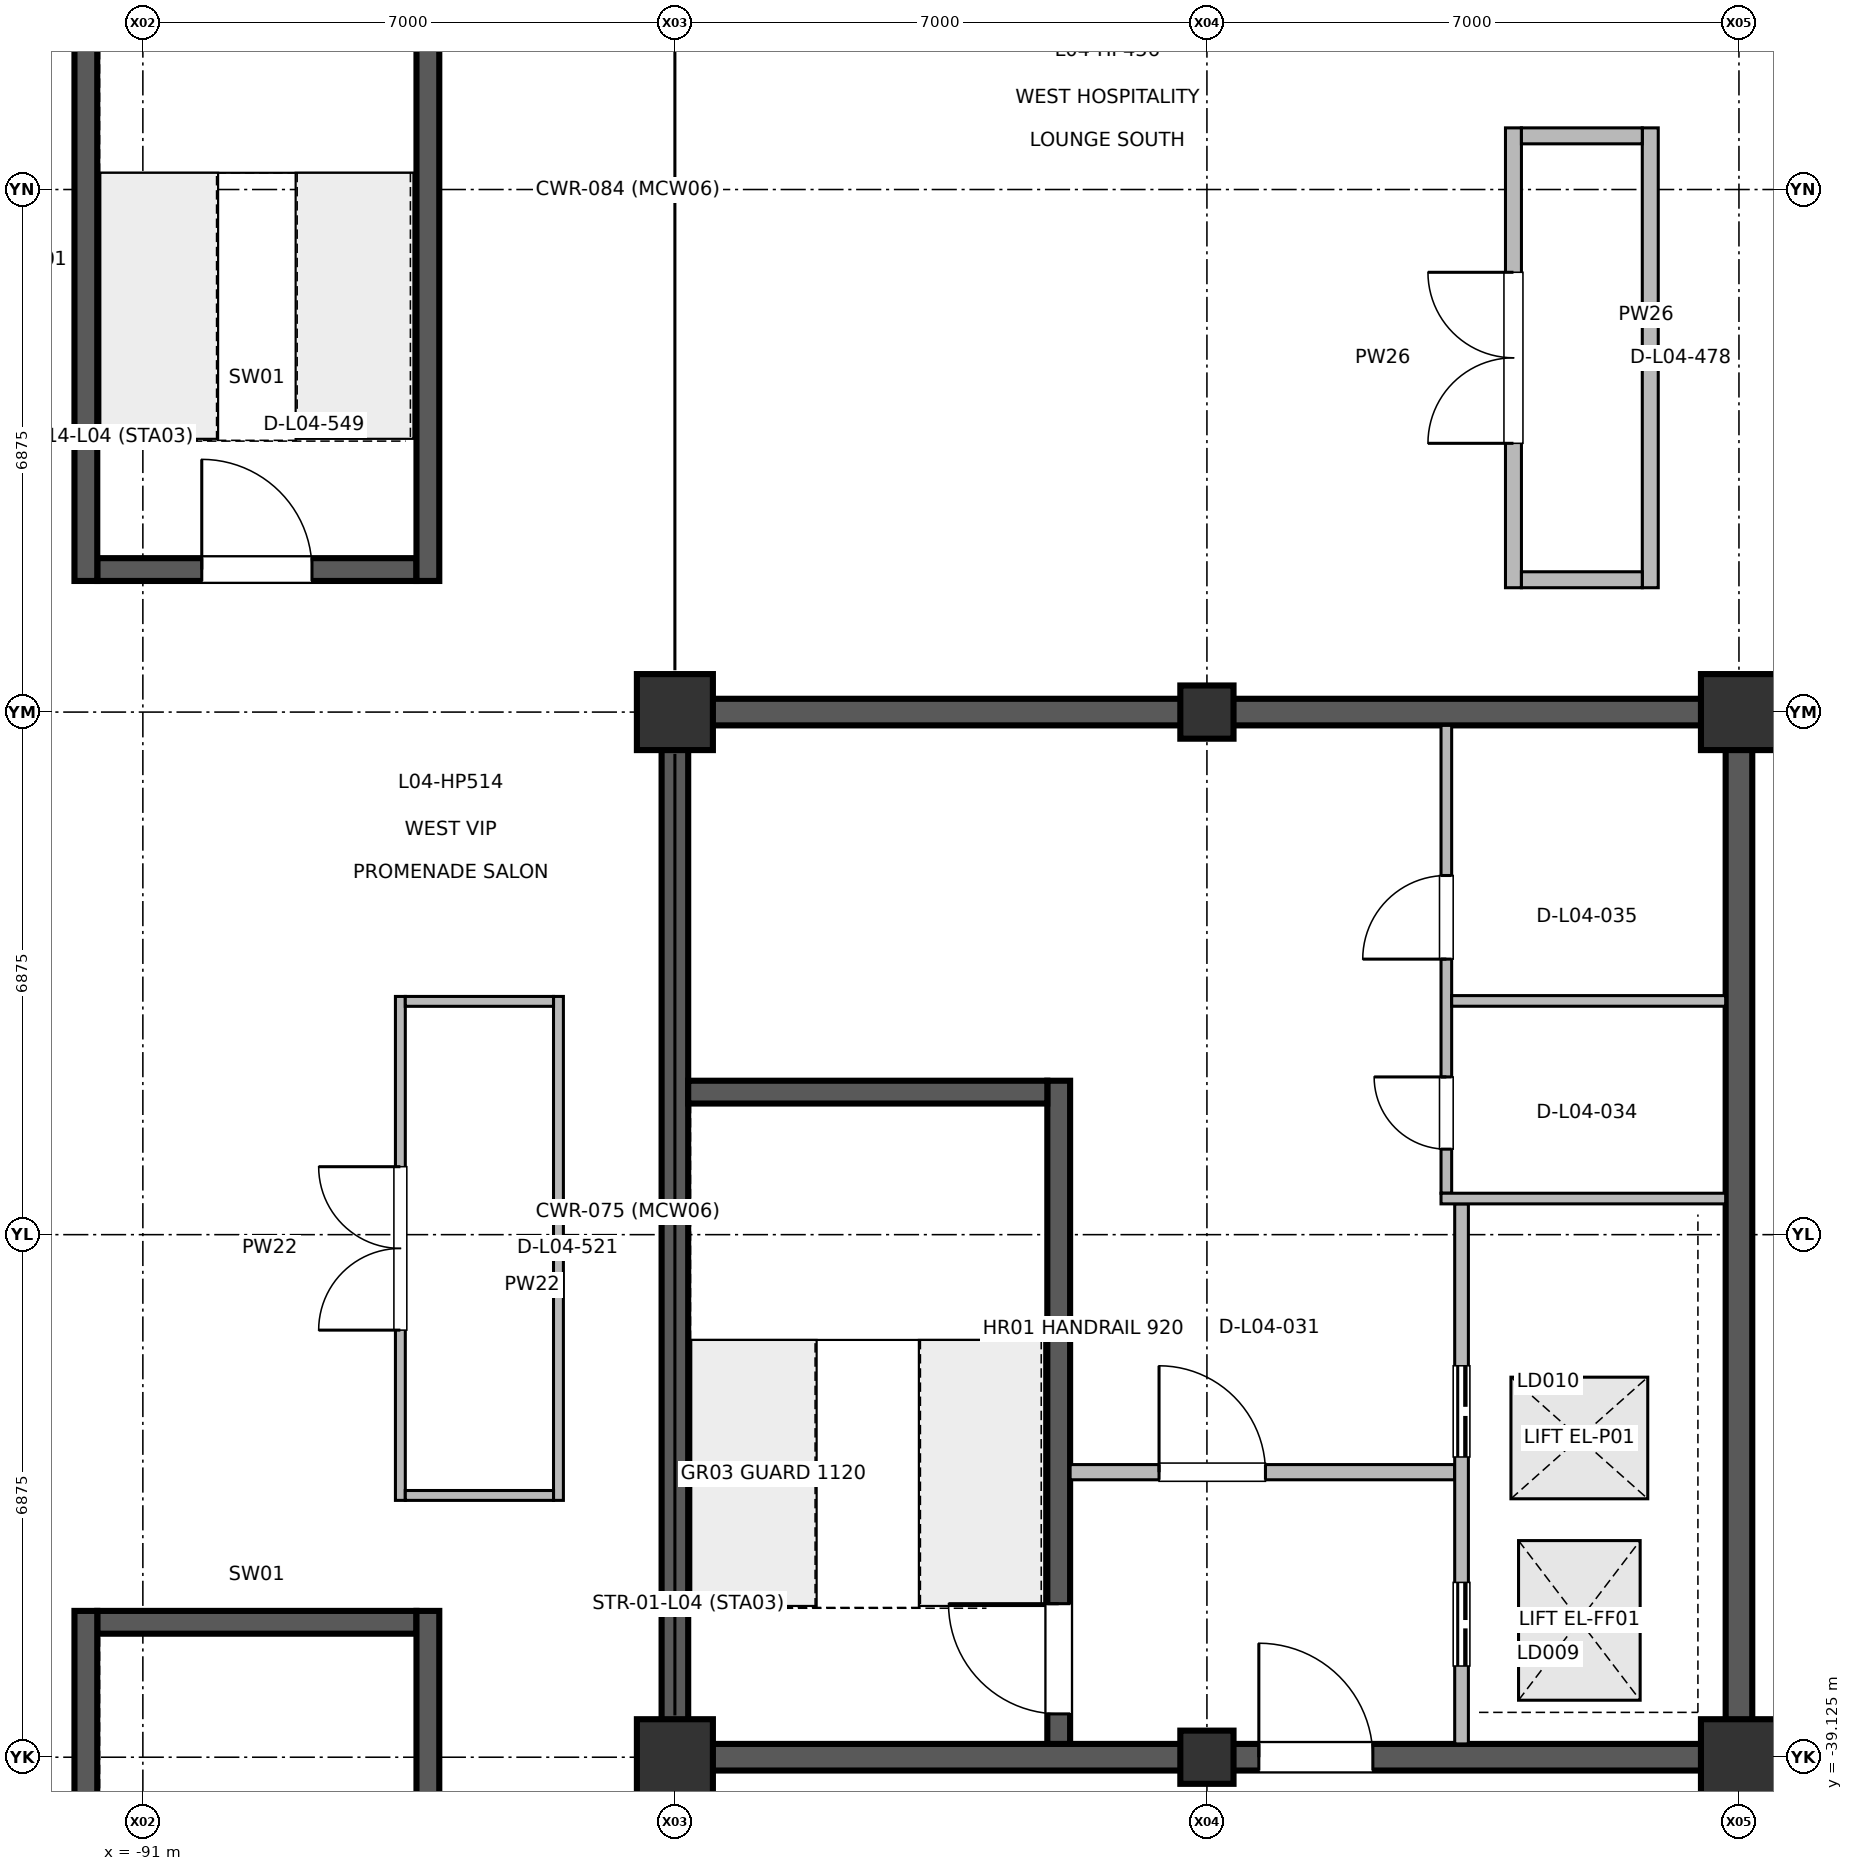
"""IFC4 building model, lengths in metres.
Left out: names, types, materials, properties, quantities, classifications, styles, units other than length and angle.
Written with IfcOpenShell. Run it as: python <this file> out.ifc"""

import sys

from ifc_helpers import new_model, si_unit, direction, frame, frame_2d, origin, origin_2d, place, context, subcontext, project, spatial, rectangle, extrude, element, fill, save


model = new_model("IFC4")
c1 = context("Model", 3, precision=1e-05, world=origin(), true_north=direction((0.0, 1.0)))
c2 = subcontext(c1, "Body", "Model", "MODEL_VIEW")
j1 = project(units=[si_unit("LENGTHUNIT", "METRE"), si_unit("PLANEANGLEUNIT", "RADIAN")], contexts=[c1])
p1 = place(None, origin())
s1 = spatial("IfcSite", under=j1, at=p1, CompositionType="ELEMENT")
p2 = place(p1, origin())
s2 = spatial("IfcBuilding", under=s1, at=p2, CompositionType="ELEMENT")
p3 = place(p2, frame((0.0, 0.0, 16.2)))
s3 = spatial("IfcBuildingStorey", under=s2, at=p3, CompositionType="ELEMENT", Elevation=16.2)
for number, where, z_axis, x_axis in (
    (1, (-84.0, -39.125, 0.0), (0.0, 0.0, 1.0), (1.0, 0.0, 0.0)),
    (2, (-84.0, -25.375, 0.0), (0.0, 0.0, 1.0), (1.0, 0.0, 0.0)),
):
    element("IfcColumn", number, at=place(p3, frame(where, z_axis=z_axis, x_axis=x_axis)), inside=s3, PredefinedType="COLUMN", context=c2, shape_type="SweptSolid", body=[
        extrude(rectangle(XDim=1.0, YDim=1.0, at=origin_2d()), origin(), (0.0, 0.0, 1.0), 4.798),
    ])
for number, where, z_axis, x_axis in (
    (3, (-77.0, -39.125, 0.0), (0.0, 0.0, 1.0), (1.0, 0.0, 0.0)),
    (4, (-77.0, -25.375, 0.0), (0.0, 0.0, 1.0), (1.0, 0.0, 0.0)),
):
    element("IfcColumn", number, at=place(p3, frame(where, z_axis=z_axis, x_axis=x_axis)), inside=s3, PredefinedType="COLUMN", context=c2, shape_type="SweptSolid", body=[
        extrude(rectangle(XDim=0.7, YDim=0.7, at=origin_2d()), origin(), (0.0, 0.0, 1.0), 4.6),
    ])
for number, where, z_axis, x_axis in (
    (5, (-70.0, -39.125, 0.0), (0.0, 0.0, 1.0), (1.0, 0.0, 0.0)),
    (6, (-70.0, -25.375, 0.0), (0.0, 0.0, 1.0), (1.0, 0.0, 0.0)),
):
    element("IfcColumn", number, at=place(p3, frame(where, z_axis=z_axis, x_axis=x_axis)), inside=s3, PredefinedType="COLUMN", context=c2, shape_type="SweptSolid", body=[
        extrude(rectangle(XDim=1.0, YDim=1.0, at=origin_2d()), origin(), (0.0, 0.0, 1.0), 4.798),
    ])
for number, where, z_axis, x_axis in (
    (7, (-84.0, -38.95, 0.0), (0.0, 0.0, 1.0), (0.0, 1.0, 0.0)),
    (8, (-70.0, -38.95, 0.0), (0.0, 0.0, 1.0), (0.0, 1.0, 0.0)),
):
    element("IfcWall", number, at=place(p3, frame(where, z_axis=z_axis, x_axis=x_axis)), inside=s3, PredefinedType="SHEAR", context=c2, shape_type="SweptSolid", body=[
        extrude(rectangle(XDim=13.4, YDim=0.35, at=frame_2d((6.7, 0.0))), origin(), (0.0, 0.0, 1.0), 4.6),
    ])
p4 = place(p3, frame((-83.825, -39.125, 0.0), z_axis=(0.0, 0.0, 1.0), x_axis=(1.0, 0.0, 0.0)))
e9 = element("IfcWall", 9, at=p4, inside=s3, PredefinedType="SHEAR", context=c2, shape_type="SweptSolid", body=[
    extrude(rectangle(XDim=13.65, YDim=0.35, at=frame_2d((6.825, 0.0))), origin(), (0.0, 0.0, 1.0), 4.6),
])
p5 = place(p4, frame((7.508, 0.0, 0.0)))
e10 = element("IfcOpeningElement", 10, at=p5, cuts=e9, PredefinedType="OPENING", context=c2, shape_type="SweptSolid", body=[
    extrude(rectangle(XDim=1.5, YDim=2.2, at=frame_2d((0.75, 1.1))), frame((0.0, 0.185, 0.0), z_axis=(0.0, -1.0, 0.0), x_axis=(1.0, 0.0, 0.0)), (0.0, 0.0, 1.0), 0.37),
])
p6 = place(p3, frame((-83.825, -25.375, 0.0), z_axis=(0.0, 0.0, 1.0), x_axis=(1.0, 0.0, 0.0)))
e11 = element("IfcWall", 11, at=p6, inside=s3, PredefinedType="SHEAR", context=c2, shape_type="SweptSolid", body=[
    extrude(rectangle(XDim=13.65, YDim=0.35, at=frame_2d((6.825, 0.0))), origin(), (0.0, 0.0, 1.0), 4.6),
])
p7 = place(p3, frame((-78.95, -38.95, 0.0), z_axis=(0.0, 0.0, 1.0), x_axis=(0.0, 1.0, 0.0)))
e12 = element("IfcWall", 12, at=p7, inside=s3, PredefinedType="SHEAR", context=c2, shape_type="SweptSolid", body=[
    extrude(rectangle(XDim=8.725, YDim=0.3, at=frame_2d((4.362, 0.0))), origin(), (0.0, 0.0, 1.0), 4.6),
])
p8 = place(p7, frame((0.395, 0.0, 0.0)))
e13 = element("IfcOpeningElement", 13, at=p8, cuts=e12, PredefinedType="OPENING", context=c2, shape_type="SweptSolid", body=[
    extrude(rectangle(XDim=1.45, YDim=2.2, at=frame_2d((0.725, 1.1))), frame((0.0, 0.16, 0.0), z_axis=(0.0, -1.0, 0.0), x_axis=(1.0, 0.0, 0.0)), (0.0, 0.0, 1.0), 0.32),
])
p9 = place(p3, frame((-78.8, -35.375, 0.0), z_axis=(0.0, 0.0, 1.0), x_axis=(1.0, 0.0, 0.0)))
e14 = element("IfcWall", 14, at=p9, inside=s3, PredefinedType="PARTITIONING", context=c2, shape_type="SweptSolid", body=[
    extrude(rectangle(XDim=5.06, YDim=0.2, at=frame_2d((2.53, 0.0))), origin(), (0.0, 0.0, 1.0), 3.82),
])
p10 = place(p9, frame((1.17, 0.0, 0.0)))
e15 = element("IfcOpeningElement", 15, at=p10, cuts=e14, PredefinedType="OPENING", context=c2, shape_type="SweptSolid", body=[
    extrude(rectangle(XDim=1.4, YDim=2.2, at=frame_2d((0.7, 1.1))), frame((0.0, 0.11, 0.0), z_axis=(0.0, -1.0, 0.0), x_axis=(1.0, 0.0, 0.0)), (0.0, 0.0, 1.0), 0.22),
])
p11 = place(p3, frame((-73.65, -38.95, 0.0), z_axis=(0.0, 0.0, 1.0), x_axis=(0.0, 1.0, 0.0)))
e16 = element("IfcWall", 16, at=p11, inside=s3, PredefinedType="PARTITIONING", context=c2, shape_type="SweptSolid", body=[
    extrude(rectangle(XDim=7.105, YDim=0.18, at=frame_2d((3.552, 0.0))), origin(), (0.0, 0.0, 1.0), 3.82),
])
p12 = place(p11, frame((1.025, 0.0, 0.0)))
e17 = element("IfcOpeningElement", 17, at=p12, cuts=e16, PredefinedType="OPENING", context=c2, shape_type="SweptSolid", body=[
    extrude(rectangle(XDim=1.1, YDim=2.2, at=frame_2d((0.55, 1.1))), frame((0.0, 0.1, 0.0), z_axis=(0.0, -1.0, 0.0), x_axis=(1.0, 0.0, 0.0)), (0.0, 0.0, 1.0), 0.2),
])
p13 = place(p11, frame((3.775, 0.0, 0.0)))
e18 = element("IfcOpeningElement", 18, at=p13, cuts=e16, PredefinedType="OPENING", context=c2, shape_type="SweptSolid", body=[
    extrude(rectangle(XDim=1.2, YDim=2.25, at=frame_2d((0.6, 1.125))), frame((0.0, 0.1, 0.0), z_axis=(0.0, -1.0, 0.0), x_axis=(1.0, 0.0, 0.0)), (0.0, 0.0, 1.0), 0.2),
])
p14 = place(p3, frame((-73.85, -31.705, 0.0), z_axis=(0.0, 0.0, 1.0), x_axis=(0.0, 1.0, 0.0)))
e19 = element("IfcWall", 19, at=p14, inside=s3, PredefinedType="PARTITIONING", context=c2, shape_type="SweptSolid", body=[
    extrude(rectangle(XDim=6.155, YDim=0.14, at=frame_2d((3.078, 0.0))), origin(), (0.0, 0.0, 1.0), 3.82),
])
p15 = place(p14, frame((0.58, 0.0, 0.0)))
e20 = element("IfcOpeningElement", 20, at=p15, cuts=e19, PredefinedType="OPENING", context=c2, shape_type="SweptSolid", body=[
    extrude(rectangle(XDim=0.95, YDim=2.15, at=frame_2d((0.475, 1.075))), frame((0.0, 0.08, 0.0), z_axis=(0.0, -1.0, 0.0), x_axis=(1.0, 0.0, 0.0)), (0.0, 0.0, 1.0), 0.16),
])
p16 = place(p14, frame((3.08, 0.0, 0.0)))
e21 = element("IfcOpeningElement", 21, at=p16, cuts=e19, PredefinedType="OPENING", context=c2, shape_type="SweptSolid", body=[
    extrude(rectangle(XDim=1.1, YDim=2.15, at=frame_2d((0.55, 1.075))), frame((0.0, 0.08, 0.0), z_axis=(0.0, -1.0, 0.0), x_axis=(1.0, 0.0, 0.0)), (0.0, 0.0, 1.0), 0.16),
])
p17 = place(p3, frame((-72.967, -23.739, 0.0), z_axis=(0.0, 0.0, 1.0), x_axis=(0.0, 1.0, 0.0)))
e22 = element("IfcWall", 22, at=p17, inside=s3, PredefinedType="PARTITIONING", context=c2, shape_type="SweptSolid", body=[
    extrude(rectangle(XDim=6.05, YDim=0.21, at=frame_2d((3.025, 0.0))), origin(), (0.0, 0.0, 1.0), 3.82),
])
p18 = place(p17, frame((1.9, 0.0, 0.0)))
e23 = element("IfcOpeningElement", 23, at=p18, cuts=e22, PredefinedType="OPENING", context=c2, shape_type="SweptSolid", body=[
    extrude(rectangle(XDim=2.25, YDim=2.45, at=frame_2d((1.125, 1.225))), frame((0.0, 0.115, 0.0), z_axis=(0.0, -1.0, 0.0), x_axis=(1.0, 0.0, 0.0)), (0.0, 0.0, 1.0), 0.23),
])
p19 = place(p3, frame((-87.612, -35.746, 0.0), z_axis=(0.0, 0.0, 1.0), x_axis=(0.0, 1.0, 0.0)))
e24 = element("IfcWall", 24, at=p19, inside=s3, PredefinedType="PARTITIONING", context=c2, shape_type="SweptSolid", body=[
    extrude(rectangle(XDim=6.63, YDim=0.13, at=frame_2d((3.315, 0.0))), origin(), (0.0, 0.0, 1.0), 3.82),
])
p20 = place(p19, frame((2.24, 0.0, 0.0)))
e25 = element("IfcOpeningElement", 25, at=p20, cuts=e24, PredefinedType="OPENING", context=c2, shape_type="SweptSolid", body=[
    extrude(rectangle(XDim=2.15, YDim=2.45, at=frame_2d((1.075, 1.225))), frame((0.0, 0.075, 0.0), z_axis=(0.0, -1.0, 0.0), x_axis=(1.0, 0.0, 0.0)), (0.0, 0.0, 1.0), 0.15),
])
p21 = place(p3, frame((-73.92, -31.775, 0.0), z_axis=(0.0, 0.0, 1.0), x_axis=(1.0, 0.0, 0.0)))
e26 = element("IfcWall", 26, at=p21, inside=s3, PredefinedType="PARTITIONING", context=c2, shape_type="SweptSolid", body=[
    extrude(rectangle(XDim=3.745, YDim=0.14, at=frame_2d((1.873, 0.0))), origin(), (0.0, 0.0, 1.0), 3.82),
])
p22 = place(p3, frame((-73.78, -29.175, 0.0), z_axis=(0.0, 0.0, 1.0), x_axis=(1.0, 0.0, 0.0)))
e27 = element("IfcWall", 27, at=p22, inside=s3, PredefinedType="PARTITIONING", context=c2, shape_type="SweptSolid", body=[
    extrude(rectangle(XDim=3.605, YDim=0.14, at=frame_2d((1.802, 0.0))), origin(), (0.0, 0.0, 1.0), 3.82),
])
p23 = place(p3, frame((-71.167, -23.739, 0.0), z_axis=(0.0, 0.0, 1.0), x_axis=(0.0, 1.0, 0.0)))
e28 = element("IfcWall", 28, at=p23, inside=s3, PredefinedType="PARTITIONING", context=c2, shape_type="SweptSolid", body=[
    extrude(rectangle(XDim=6.05, YDim=0.21, at=frame_2d((3.025, 0.0))), origin(), (0.0, 0.0, 1.0), 3.82),
])
for number, where, z_axis, x_axis in (
    (29, (-72.862, -23.634, 0.0), (0.0, 0.0, 1.0), (1.0, 0.0, 0.0)),
    (30, (-72.862, -17.794, 0.0), (0.0, 0.0, 1.0), (1.0, 0.0, 0.0)),
):
    element("IfcWall", number, at=place(p3, frame(where, z_axis=z_axis, x_axis=x_axis)), inside=s3, PredefinedType="PARTITIONING", context=c2, shape_type="SweptSolid", body=[
        extrude(rectangle(XDim=1.59, YDim=0.21, at=frame_2d((0.795, 0.0))), origin(), (0.0, 0.0, 1.0), 3.82),
    ])
p24 = place(p3, frame((-85.532, -35.746, 0.0), z_axis=(0.0, 0.0, 1.0), x_axis=(0.0, 1.0, 0.0)))
e31 = element("IfcWall", 31, at=p24, inside=s3, PredefinedType="PARTITIONING", context=c2, shape_type="SweptSolid", body=[
    extrude(rectangle(XDim=6.63, YDim=0.13, at=frame_2d((3.315, 0.0))), origin(), (0.0, 0.0, 1.0), 3.82),
])
for number, where, z_axis, x_axis in (
    (32, (-87.547, -35.681, 0.0), (0.0, 0.0, 1.0), (1.0, 0.0, 0.0)),
    (33, (-87.547, -29.181, 0.0), (0.0, 0.0, 1.0), (1.0, 0.0, 0.0)),
):
    element("IfcWall", number, at=place(p3, frame(where, z_axis=z_axis, x_axis=x_axis)), inside=s3, PredefinedType="PARTITIONING", context=c2, shape_type="SweptSolid", body=[
        extrude(rectangle(XDim=1.95, YDim=0.13, at=frame_2d((0.975, 0.0))), origin(), (0.0, 0.0, 1.0), 3.82),
    ])
p25 = place(p3, frame((-83.825, -30.375, 0.0), z_axis=(0.0, 0.0, 1.0), x_axis=(1.0, 0.0, 0.0)))
e34 = element("IfcWall", 34, at=p25, inside=s3, PredefinedType="SHEAR", context=c2, shape_type="SweptSolid", body=[
    extrude(rectangle(XDim=4.725, YDim=0.3, at=frame_2d((2.362, 0.0))), origin(), (0.0, 0.0, 1.0), 4.6),
])
p26 = place(p3, frame((-91.6, -37.35, 0.0), z_axis=(0.0, 0.0, 1.0), x_axis=(1.0, 0.0, 0.0)))
e35 = element("IfcWall", 35, at=p26, inside=s3, PredefinedType="SHEAR", context=c2, shape_type="SweptSolid", body=[
    extrude(rectangle(XDim=4.2, YDim=0.3, at=frame_2d((2.1, 0.0))), origin(), (0.0, 0.0, 1.0), 4.6),
])
for number, where, z_axis, x_axis in (
    (36, (-91.75, -45.65, 0.0), (0.0, 0.0, 1.0), (0.0, 1.0, 0.0)),
    (37, (-87.25, -45.65, 0.0), (0.0, 0.0, 1.0), (0.0, 1.0, 0.0)),
):
    element("IfcWall", number, at=place(p3, frame(where, z_axis=z_axis, x_axis=x_axis)), inside=s3, PredefinedType="SHEAR", context=c2, shape_type="SweptSolid", body=[
        extrude(rectangle(XDim=8.45, YDim=0.3, at=frame_2d((4.225, 0.0))), origin(), (0.0, 0.0, 1.0), 4.6),
    ])
p27 = place(p3, frame((-91.6, -23.5, 0.0), z_axis=(0.0, 0.0, 1.0), x_axis=(1.0, 0.0, 0.0)))
e38 = element("IfcWall", 38, at=p27, inside=s3, PredefinedType="SHEAR", context=c2, shape_type="SweptSolid", body=[
    extrude(rectangle(XDim=4.2, YDim=0.3, at=frame_2d((2.1, 0.0))), origin(), (0.0, 0.0, 1.0), 4.6),
])
p28 = place(p27, frame((1.375, 0.0, 0.0)))
e39 = element("IfcOpeningElement", 39, at=p28, cuts=e38, PredefinedType="OPENING", context=c2, shape_type="SweptSolid", body=[
    extrude(rectangle(XDim=1.45, YDim=2.2, at=frame_2d((0.725, 1.1))), frame((0.0, 0.16, 0.0), z_axis=(0.0, -1.0, 0.0), x_axis=(1.0, 0.0, 0.0)), (0.0, 0.0, 1.0), 0.32),
])
for number, where, z_axis, x_axis in (
    (40, (-91.75, -23.65, 0.0), (0.0, 0.0, 1.0), (0.0, 1.0, 0.0)),
    (41, (-87.25, -23.65, 0.0), (0.0, 0.0, 1.0), (0.0, 1.0, 0.0)),
):
    element("IfcWall", number, at=place(p3, frame(where, z_axis=z_axis, x_axis=x_axis)), inside=s3, PredefinedType="SHEAR", context=c2, shape_type="SweptSolid", body=[
        extrude(rectangle(XDim=8.45, YDim=0.3, at=frame_2d((4.225, 0.0))), origin(), (0.0, 0.0, 1.0), 4.6),
    ])
p29 = place(p5, origin())
e42 = element("IfcDoor", 42, at=p29, inside=s3, OperationType="SINGLE_SWING_LEFT", PredefinedType="DOOR", context=c2, shape_type="SweptSolid", body=[
    extrude(rectangle(XDim=1.5, YDim=2.2, at=frame_2d((0.75, 1.1))), frame((0.0, 0.025, 0.0), z_axis=(0.0, -1.0, 0.0), x_axis=(1.0, 0.0, 0.0)), (0.0, 0.0, 1.0), 0.05),
])
fill(e10, e42)
p30 = place(p8, origin())
e43 = element("IfcDoor", 43, at=p30, inside=s3, OperationType="SINGLE_SWING_RIGHT", PredefinedType="DOOR", context=c2, shape_type="SweptSolid", body=[
    extrude(rectangle(XDim=1.45, YDim=2.2, at=frame_2d((0.725, 1.1))), frame((0.0, 0.025, 0.0), z_axis=(0.0, -1.0, 0.0), x_axis=(1.0, 0.0, 0.0)), (0.0, 0.0, 1.0), 0.05),
])
fill(e13, e43)
p31 = place(p10, origin())
e44 = element("IfcDoor", 44, at=p31, inside=s3, OperationType="SINGLE_SWING_LEFT", PredefinedType="DOOR", context=c2, shape_type="SweptSolid", body=[
    extrude(rectangle(XDim=1.4, YDim=2.2, at=frame_2d((0.7, 1.1))), frame((0.0, 0.025, 0.0), z_axis=(0.0, -1.0, 0.0), x_axis=(1.0, 0.0, 0.0)), (0.0, 0.0, 1.0), 0.05),
])
fill(e15, e44)
p32 = place(p12, origin())
e45 = element("IfcDoor", 45, at=p32, inside=s3, OperationType="DOUBLE_DOOR_SLIDING", PredefinedType="DOOR", context=c2, shape_type="SweptSolid", body=[
    extrude(rectangle(XDim=1.1, YDim=2.2, at=frame_2d((0.55, 1.1))), frame((0.0, 0.025, 0.0), z_axis=(0.0, -1.0, 0.0), x_axis=(1.0, 0.0, 0.0)), (0.0, 0.0, 1.0), 0.05),
])
fill(e17, e45)
p33 = place(p13, origin())
e46 = element("IfcDoor", 46, at=p33, inside=s3, OperationType="DOUBLE_DOOR_SLIDING", PredefinedType="DOOR", context=c2, shape_type="SweptSolid", body=[
    extrude(rectangle(XDim=1.2, YDim=2.25, at=frame_2d((0.6, 1.125))), frame((0.0, 0.025, 0.0), z_axis=(0.0, -1.0, 0.0), x_axis=(1.0, 0.0, 0.0)), (0.0, 0.0, 1.0), 0.05),
])
fill(e18, e46)
p34 = place(p15, origin())
e47 = element("IfcDoor", 47, at=p34, inside=s3, OperationType="SINGLE_SWING_RIGHT", PredefinedType="DOOR", context=c2, shape_type="SweptSolid", body=[
    extrude(rectangle(XDim=0.95, YDim=2.15, at=frame_2d((0.475, 1.075))), frame((0.0, 0.025, 0.0), z_axis=(0.0, -1.0, 0.0), x_axis=(1.0, 0.0, 0.0)), (0.0, 0.0, 1.0), 0.05),
])
fill(e20, e47)
p35 = place(p16, origin())
e48 = element("IfcDoor", 48, at=p35, inside=s3, OperationType="SINGLE_SWING_LEFT", PredefinedType="DOOR", context=c2, shape_type="SweptSolid", body=[
    extrude(rectangle(XDim=1.1, YDim=2.15, at=frame_2d((0.55, 1.075))), frame((0.0, 0.025, 0.0), z_axis=(0.0, -1.0, 0.0), x_axis=(1.0, 0.0, 0.0)), (0.0, 0.0, 1.0), 0.05),
])
fill(e21, e48)
p36 = place(p18, origin())
e49 = element("IfcDoor", 49, at=p36, inside=s3, OperationType="DOUBLE_DOOR_SINGLE_SWING", PredefinedType="DOOR", context=c2, shape_type="SweptSolid", body=[
    extrude(rectangle(XDim=2.25, YDim=2.45, at=frame_2d((1.125, 1.225))), frame((0.0, 0.025, 0.0), z_axis=(0.0, -1.0, 0.0), x_axis=(1.0, 0.0, 0.0)), (0.0, 0.0, 1.0), 0.05),
])
fill(e23, e49)
p37 = place(p20, origin())
e50 = element("IfcDoor", 50, at=p37, inside=s3, OperationType="DOUBLE_DOOR_SINGLE_SWING", PredefinedType="DOOR", context=c2, shape_type="SweptSolid", body=[
    extrude(rectangle(XDim=2.15, YDim=2.45, at=frame_2d((1.075, 1.225))), frame((0.0, 0.025, 0.0), z_axis=(0.0, -1.0, 0.0), x_axis=(1.0, 0.0, 0.0)), (0.0, 0.0, 1.0), 0.05),
])
fill(e25, e50)
p38 = place(p28, origin())
e51 = element("IfcDoor", 51, at=p38, inside=s3, OperationType="SINGLE_SWING_LEFT", PredefinedType="DOOR", context=c2, shape_type="SweptSolid", body=[
    extrude(rectangle(XDim=1.45, YDim=2.2, at=frame_2d((0.725, 1.1))), frame((0.0, 0.025, 0.0), z_axis=(0.0, -1.0, 0.0), x_axis=(1.0, 0.0, 0.0)), (0.0, 0.0, 1.0), 0.05),
])
fill(e39, e51)
save(model, sys.argv[1])
